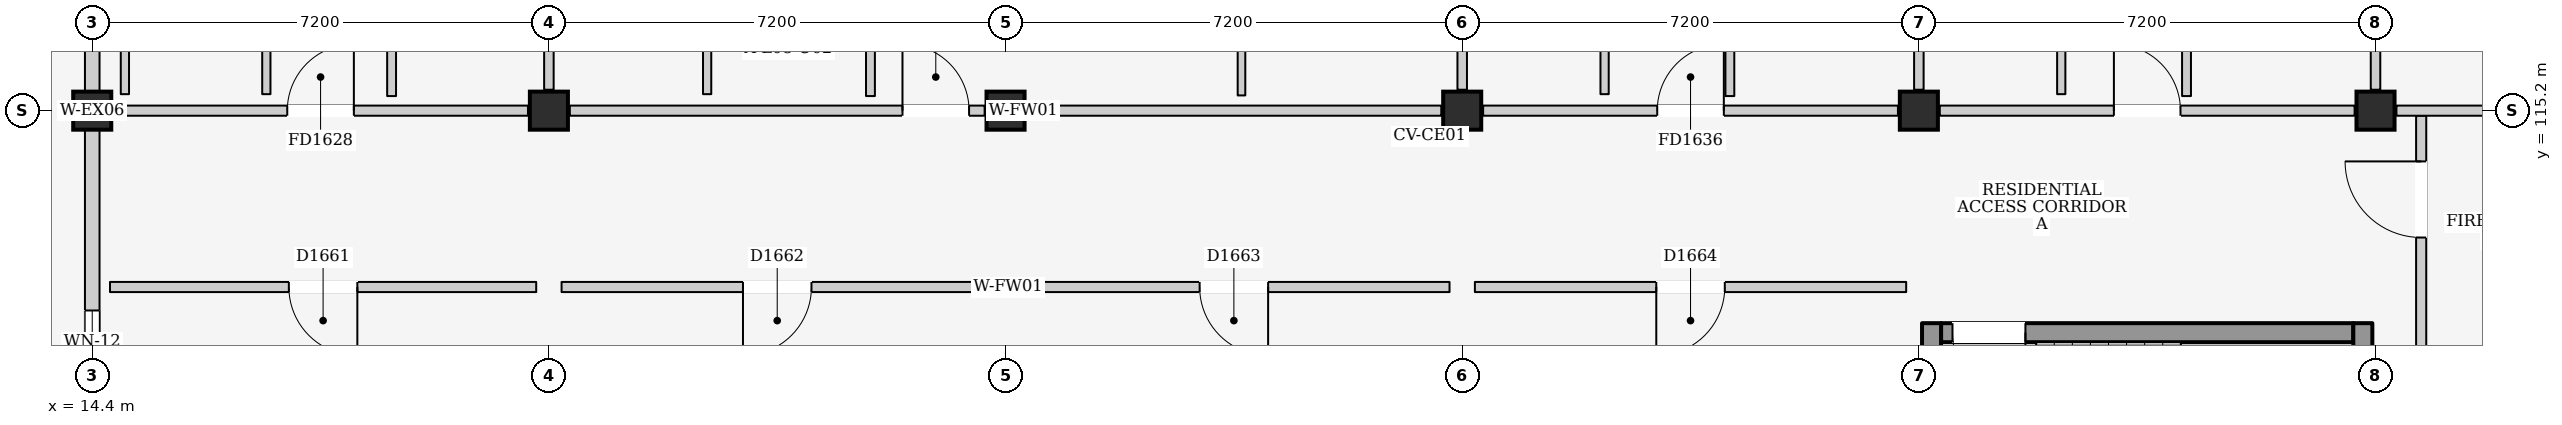
"""IFC4 building model, lengths in metres.
Left out: names, types, materials, properties, quantities, classifications, styles, units other than length and angle.
Written with IfcOpenShell. Run it as: python <this file> out.ifc"""

import sys

from ifc_helpers import new_model, si_unit, direction, frame, frame_2d, origin, origin_2d, place, context, subcontext, project, spatial, rectangle, extrude, element, fill, save


model = new_model("IFC4")
c1 = context("Model", 3, precision=1e-05, world=origin(), true_north=direction((0.0, 1.0)))
c2 = subcontext(c1, "Body", "Model", "MODEL_VIEW")
j1 = project(units=[si_unit("LENGTHUNIT", "METRE"), si_unit("PLANEANGLEUNIT", "RADIAN")], contexts=[c1])
p1 = place(None, origin())
s1 = spatial("IfcSite", under=j1, at=p1, CompositionType="ELEMENT")
p2 = place(p1, origin())
s2 = spatial("IfcBuilding", under=s1, at=p2, CompositionType="ELEMENT")
p3 = place(p2, frame((0.0, 0.0, 28.3)))
s3 = spatial("IfcBuildingStorey", under=s2, at=p3, CompositionType="ELEMENT", Elevation=28.3)
for number, where, z_axis, x_axis in (
    (1, (14.4, 115.2, 0.0), (0.0, 0.0, 1.0), (1.0, 0.0, 0.0)),
    (2, (21.6, 115.2, 0.0), (0.0, 0.0, 1.0), (1.0, 0.0, 0.0)),
    (3, (28.8, 115.2, 0.0), (0.0, 0.0, 1.0), (1.0, 0.0, 0.0)),
    (4, (36.0, 115.2, 0.0), (0.0, 0.0, 1.0), (1.0, 0.0, 0.0)),
    (5, (43.2, 115.2, 0.0), (0.0, 0.0, 1.0), (1.0, 0.0, 0.0)),
    (6, (50.4, 115.2, 0.0), (0.0, 0.0, 1.0), (1.0, 0.0, 0.0)),
):
    element("IfcColumn", number, at=place(p3, frame(where, z_axis=z_axis, x_axis=x_axis)), inside=s3, PredefinedType="COLUMN", context=c2, shape_type="SweptSolid", body=[
        extrude(rectangle(XDim=0.6, YDim=0.6, at=origin_2d()), origin(), (0.0, 0.0, 1.0), 3.2),
    ])
p4 = place(p3, frame((14.4, 108.3, 0.0), z_axis=(0.0, 0.0, 1.0), x_axis=(0.0, 1.0, 0.0)))
e7 = element("IfcWall", 7, at=p4, inside=s3, PredefinedType="ELEMENTEDWALL", context=c2, shape_type="SweptSolid", body=[
    extrude(rectangle(XDim=6.6, YDim=0.23, at=frame_2d((3.3, 0.0))), origin(), (0.0, 0.0, 1.0), 2.435),
])
p5 = place(p4, frame((2.75, 0.0, 1.1)))
e8 = element("IfcOpeningElement", 8, at=p5, cuts=e7, PredefinedType="OPENING", context=c2, shape_type="SweptSolid", body=[
    extrude(rectangle(XDim=1.0, YDim=0.9, at=frame_2d((0.5, 0.45))), frame((0.0, 0.13, 0.0), z_axis=(0.0, -1.0, 0.0), x_axis=(1.0, 0.0, 0.0)), (0.0, 0.0, 1.0), 0.26),
])
p6 = place(p3, frame((14.4, 115.5, 0.0), z_axis=(0.0, 0.0, 1.0), x_axis=(0.0, 1.0, 0.0)))
e9 = element("IfcWall", 9, at=p6, inside=s3, PredefinedType="ELEMENTEDWALL", context=c2, shape_type="SweptSolid", body=[
    extrude(rectangle(XDim=6.6, YDim=0.23, at=frame_2d((3.3, 0.0))), origin(), (0.0, 0.0, 1.0), 2.435),
])
p7 = place(p6, frame((3.6, 0.0, 0.0)))
e10 = element("IfcOpeningElement", 10, at=p7, cuts=e9, PredefinedType="OPENING", context=c2, shape_type="SweptSolid", body=[
    extrude(rectangle(XDim=1.08, YDim=2.12, at=frame_2d((0.54, 1.06))), frame((0.0, 0.13, 0.0), z_axis=(0.0, -1.0, 0.0), x_axis=(1.0, 0.0, 0.0)), (0.0, 0.0, 1.0), 0.26),
])
p8 = place(p3, frame((43.55, 111.7, 0.0), z_axis=(0.0, 0.0, 1.0), x_axis=(1.0, 0.0, 0.0)))
e11 = element("IfcWall", 11, at=p8, inside=s3, PredefinedType="SHEAR", context=c2, shape_type="SweptSolid", body=[
    extrude(rectangle(XDim=6.5, YDim=0.3, at=frame_2d((3.25, 0.0))), origin(), (0.0, 0.0, 1.0), 2.95),
])
p9 = place(p8, frame((0.18, 0.0, 0.0)))
e12 = element("IfcOpeningElement", 12, at=p9, cuts=e11, PredefinedType="OPENING", context=c2, shape_type="SweptSolid", body=[
    extrude(rectangle(XDim=1.15, YDim=2.2, at=frame_2d((0.575, 1.1))), frame((0.0, 0.165, 0.0), z_axis=(0.0, -1.0, 0.0), x_axis=(1.0, 0.0, 0.0)), (0.0, 0.0, 1.0), 0.33),
])
for number, where, z_axis, x_axis in (
    (13, (43.4, 108.15, 0.0), (0.0, 0.0, 1.0), (0.0, 1.0, 0.0)),
    (14, (50.2, 108.15, 0.0), (0.0, 0.0, 1.0), (0.0, 1.0, 0.0)),
):
    element("IfcWall", number, at=place(p3, frame(where, z_axis=z_axis, x_axis=x_axis)), inside=s3, PredefinedType="SHEAR", context=c2, shape_type="SweptSolid", body=[
        extrude(rectangle(XDim=3.7, YDim=0.3, at=frame_2d((1.85, 0.0))), origin(), (0.0, 0.0, 1.0), 2.95),
    ])
p10 = place(p3, frame((51.12, 111.1, 0.0), z_axis=(0.0, 0.0, 1.0), x_axis=(0.0, 1.0, 0.0)))
e15 = element("IfcWall", 15, at=p10, inside=s3, PredefinedType="PARTITIONING", context=c2, shape_type="SweptSolid", body=[
    extrude(rectangle(XDim=4.02, YDim=0.16, at=frame_2d((2.01, 0.0))), origin(), (0.0, 0.0, 1.0), 2.95),
])
p11 = place(p10, frame((2.1, 0.0, 0.0)))
e16 = element("IfcOpeningElement", 16, at=p11, cuts=e15, PredefinedType="OPENING", context=c2, shape_type="SweptSolid", body=[
    extrude(rectangle(XDim=1.2, YDim=2.2, at=frame_2d((0.6, 1.1))), frame((0.0, 0.095, 0.0), z_axis=(0.0, -1.0, 0.0), x_axis=(1.0, 0.0, 0.0)), (0.0, 0.0, 1.0), 0.19),
])
p12 = place(p3, frame((14.73, 115.2, 0.0), z_axis=(0.0, 0.0, 1.0), x_axis=(1.0, 0.0, 0.0)))
e17 = element("IfcWall", 17, at=p12, inside=s3, PredefinedType="PARTITIONING", context=c2, shape_type="SweptSolid", body=[
    extrude(rectangle(XDim=6.54, YDim=0.16, at=frame_2d((3.27, 0.0))), origin(), (0.0, 0.0, 1.0), 2.285),
])
p13 = place(p12, frame((2.745, 0.0, 0.0)))
e18 = element("IfcOpeningElement", 18, at=p13, cuts=e17, PredefinedType="OPENING", context=c2, shape_type="SweptSolid", body=[
    extrude(rectangle(XDim=1.05, YDim=2.15, at=frame_2d((0.525, 1.075))), frame((0.0, 0.095, 0.0), z_axis=(0.0, -1.0, 0.0), x_axis=(1.0, 0.0, 0.0)), (0.0, 0.0, 1.0), 0.19),
])
p14 = place(p3, frame((21.6, 115.53, 0.0), z_axis=(0.0, 0.0, 1.0), x_axis=(0.0, 1.0, 0.0)))
e19 = element("IfcWall", 19, at=p14, inside=s3, PredefinedType="PARTITIONING", context=c2, shape_type="SweptSolid", body=[
    extrude(rectangle(XDim=6.54, YDim=0.15, at=frame_2d((3.27, 0.0))), origin(), (0.0, 0.0, 1.0), 2.435),
])
for number, where, z_axis, x_axis in (
    (20, (17.145, 115.46, 0.0), (0.0, 0.0, 1.0), (0.0, 1.0, 0.0)),
    (21, (14.915, 115.46, 0.0), (0.0, 0.0, 1.0), (0.0, 1.0, 0.0)),
):
    element("IfcWall", number, at=place(p3, frame(where, z_axis=z_axis, x_axis=x_axis)), inside=s3, PredefinedType="PARTITIONING", context=c2, shape_type="SweptSolid", body=[
        extrude(rectangle(XDim=2.13, YDim=0.13, at=frame_2d((1.065, 0.0))), origin(), (0.0, 0.0, 1.0), 2.95),
    ])
p15 = place(p3, frame((19.12, 115.43, 0.0), z_axis=(0.0, 0.0, 1.0), x_axis=(0.0, 1.0, 0.0)))
e22 = element("IfcWall", 22, at=p15, inside=s3, PredefinedType="PARTITIONING", context=c2, shape_type="SweptSolid", body=[
    extrude(rectangle(XDim=2.15, YDim=0.14, at=frame_2d((1.075, 0.0))), origin(), (0.0, 0.0, 1.0), 2.95),
])
p16 = place(p3, frame((21.93, 115.2, 0.0), z_axis=(0.0, 0.0, 1.0), x_axis=(1.0, 0.0, 0.0)))
e23 = element("IfcWall", 23, at=p16, inside=s3, PredefinedType="PARTITIONING", context=c2, shape_type="SweptSolid", body=[
    extrude(rectangle(XDim=6.54, YDim=0.16, at=frame_2d((3.27, 0.0))), origin(), (0.0, 0.0, 1.0), 2.285),
])
p17 = place(p16, frame((5.245, 0.0, 0.0)))
e24 = element("IfcOpeningElement", 24, at=p17, cuts=e23, PredefinedType="OPENING", context=c2, shape_type="SweptSolid", body=[
    extrude(rectangle(XDim=1.05, YDim=2.15, at=frame_2d((0.525, 1.075))), frame((0.0, 0.095, 0.0), z_axis=(0.0, -1.0, 0.0), x_axis=(1.0, 0.0, 0.0)), (0.0, 0.0, 1.0), 0.19),
])
p18 = place(p3, frame((29.13, 115.2, 0.0), z_axis=(0.0, 0.0, 1.0), x_axis=(1.0, 0.0, 0.0)))
e25 = element("IfcWall", 25, at=p18, inside=s3, PredefinedType="PARTITIONING", context=c2, shape_type="SweptSolid", body=[
    extrude(rectangle(XDim=6.54, YDim=0.16, at=frame_2d((3.27, 0.0))), origin(), (0.0, 0.0, 1.0), 2.285),
])
p19 = place(p3, frame((36.0, 115.53, 0.0), z_axis=(0.0, 0.0, 1.0), x_axis=(0.0, 1.0, 0.0)))
e26 = element("IfcWall", 26, at=p19, inside=s3, PredefinedType="PARTITIONING", context=c2, shape_type="SweptSolid", body=[
    extrude(rectangle(XDim=6.54, YDim=0.15, at=frame_2d((3.27, 0.0))), origin(), (0.0, 0.0, 1.0), 2.435),
])
p20 = place(p3, frame((24.095, 115.46, 0.0), z_axis=(0.0, 0.0, 1.0), x_axis=(0.0, 1.0, 0.0)))
e27 = element("IfcWall", 27, at=p20, inside=s3, PredefinedType="PARTITIONING", context=c2, shape_type="SweptSolid", body=[
    extrude(rectangle(XDim=3.04, YDim=0.13, at=frame_2d((1.52, 0.0))), origin(), (0.0, 0.0, 1.0), 2.95),
])
p21 = place(p3, frame((26.67, 115.43, 0.0), z_axis=(0.0, 0.0, 1.0), x_axis=(0.0, 1.0, 0.0)))
e28 = element("IfcWall", 28, at=p21, inside=s3, PredefinedType="PARTITIONING", context=c2, shape_type="SweptSolid", body=[
    extrude(rectangle(XDim=3.06, YDim=0.14, at=frame_2d((1.53, 0.0))), origin(), (0.0, 0.0, 1.0), 2.95),
])
p22 = place(p3, frame((32.52, 115.44, 0.0), z_axis=(0.0, 0.0, 1.0), x_axis=(0.0, 1.0, 0.0)))
e29 = element("IfcWall", 29, at=p22, inside=s3, PredefinedType="PARTITIONING", context=c2, shape_type="SweptSolid", body=[
    extrude(rectangle(XDim=3.04, YDim=0.12, at=frame_2d((1.52, 0.0))), origin(), (0.0, 0.0, 1.0), 2.95),
])
p23 = place(p22, frame((1.04, 0.0, 0.0)))
e30 = element("IfcOpeningElement", 30, at=p23, cuts=e29, PredefinedType="OPENING", context=c2, shape_type="SweptSolid", body=[
    extrude(rectangle(XDim=0.96, YDim=2.15, at=frame_2d((0.48, 1.075))), frame((0.0, 0.075, 0.0), z_axis=(0.0, -1.0, 0.0), x_axis=(1.0, 0.0, 0.0)), (0.0, 0.0, 1.0), 0.15),
])
p24 = place(p3, frame((36.33, 115.2, 0.0), z_axis=(0.0, 0.0, 1.0), x_axis=(1.0, 0.0, 0.0)))
e31 = element("IfcWall", 31, at=p24, inside=s3, PredefinedType="PARTITIONING", context=c2, shape_type="SweptSolid", body=[
    extrude(rectangle(XDim=6.54, YDim=0.16, at=frame_2d((3.27, 0.0))), origin(), (0.0, 0.0, 1.0), 2.285),
])
p25 = place(p24, frame((2.745, 0.0, 0.0)))
e32 = element("IfcOpeningElement", 32, at=p25, cuts=e31, PredefinedType="OPENING", context=c2, shape_type="SweptSolid", body=[
    extrude(rectangle(XDim=1.05, YDim=2.15, at=frame_2d((0.525, 1.075))), frame((0.0, 0.095, 0.0), z_axis=(0.0, -1.0, 0.0), x_axis=(1.0, 0.0, 0.0)), (0.0, 0.0, 1.0), 0.19),
])
p26 = place(p3, frame((43.2, 115.53, 0.0), z_axis=(0.0, 0.0, 1.0), x_axis=(0.0, 1.0, 0.0)))
e33 = element("IfcWall", 33, at=p26, inside=s3, PredefinedType="PARTITIONING", context=c2, shape_type="SweptSolid", body=[
    extrude(rectangle(XDim=6.54, YDim=0.15, at=frame_2d((3.27, 0.0))), origin(), (0.0, 0.0, 1.0), 2.435),
])
p27 = place(p3, frame((38.245, 115.46, 0.0), z_axis=(0.0, 0.0, 1.0), x_axis=(0.0, 1.0, 0.0)))
e34 = element("IfcWall", 34, at=p27, inside=s3, PredefinedType="PARTITIONING", context=c2, shape_type="SweptSolid", body=[
    extrude(rectangle(XDim=2.13, YDim=0.13, at=frame_2d((1.065, 0.0))), origin(), (0.0, 0.0, 1.0), 2.95),
])
p28 = place(p3, frame((40.22, 115.43, 0.0), z_axis=(0.0, 0.0, 1.0), x_axis=(0.0, 1.0, 0.0)))
e35 = element("IfcWall", 35, at=p28, inside=s3, PredefinedType="PARTITIONING", context=c2, shape_type="SweptSolid", body=[
    extrude(rectangle(XDim=2.15, YDim=0.14, at=frame_2d((1.075, 0.0))), origin(), (0.0, 0.0, 1.0), 2.95),
])
p29 = place(p3, frame((43.53, 115.2, 0.0), z_axis=(0.0, 0.0, 1.0), x_axis=(1.0, 0.0, 0.0)))
e36 = element("IfcWall", 36, at=p29, inside=s3, PredefinedType="PARTITIONING", context=c2, shape_type="SweptSolid", body=[
    extrude(rectangle(XDim=6.54, YDim=0.16, at=frame_2d((3.27, 0.0))), origin(), (0.0, 0.0, 1.0), 2.285),
])
p30 = place(p29, frame((2.745, 0.0, 0.0)))
e37 = element("IfcOpeningElement", 37, at=p30, cuts=e36, PredefinedType="OPENING", context=c2, shape_type="SweptSolid", body=[
    extrude(rectangle(XDim=1.05, YDim=2.15, at=frame_2d((0.525, 1.075))), frame((0.0, 0.095, 0.0), z_axis=(0.0, -1.0, 0.0), x_axis=(1.0, 0.0, 0.0)), (0.0, 0.0, 1.0), 0.19),
])
p31 = place(p3, frame((50.4, 115.53, 0.0), z_axis=(0.0, 0.0, 1.0), x_axis=(0.0, 1.0, 0.0)))
e38 = element("IfcWall", 38, at=p31, inside=s3, PredefinedType="PARTITIONING", context=c2, shape_type="SweptSolid", body=[
    extrude(rectangle(XDim=6.54, YDim=0.15, at=frame_2d((3.27, 0.0))), origin(), (0.0, 0.0, 1.0), 2.435),
])
p32 = place(p3, frame((45.445, 115.46, 0.0), z_axis=(0.0, 0.0, 1.0), x_axis=(0.0, 1.0, 0.0)))
e39 = element("IfcWall", 39, at=p32, inside=s3, PredefinedType="PARTITIONING", context=c2, shape_type="SweptSolid", body=[
    extrude(rectangle(XDim=2.13, YDim=0.13, at=frame_2d((1.065, 0.0))), origin(), (0.0, 0.0, 1.0), 2.95),
])
p33 = place(p3, frame((47.42, 115.43, 0.0), z_axis=(0.0, 0.0, 1.0), x_axis=(0.0, 1.0, 0.0)))
e40 = element("IfcWall", 40, at=p33, inside=s3, PredefinedType="PARTITIONING", context=c2, shape_type="SweptSolid", body=[
    extrude(rectangle(XDim=2.15, YDim=0.14, at=frame_2d((1.075, 0.0))), origin(), (0.0, 0.0, 1.0), 2.95),
])
p34 = place(p3, frame((50.73, 115.2, 0.0), z_axis=(0.0, 0.0, 1.0), x_axis=(1.0, 0.0, 0.0)))
e41 = element("IfcWall", 41, at=p34, inside=s3, PredefinedType="PARTITIONING", context=c2, shape_type="SweptSolid", body=[
    extrude(rectangle(XDim=6.54, YDim=0.16, at=frame_2d((3.27, 0.0))), origin(), (0.0, 0.0, 1.0), 2.285),
])
p35 = place(p3, frame((14.68, 112.42, 0.0), z_axis=(0.0, 0.0, 1.0), x_axis=(1.0, 0.0, 0.0)))
e42 = element("IfcWall", 42, at=p35, inside=s3, PredefinedType="PARTITIONING", context=c2, shape_type="SweptSolid", body=[
    extrude(rectangle(XDim=6.72, YDim=0.16, at=frame_2d((3.36, 0.0))), origin(), (0.0, 0.0, 1.0), 2.95),
])
p36 = place(p35, frame((2.82, 0.0, 0.0)))
e43 = element("IfcOpeningElement", 43, at=p36, cuts=e42, PredefinedType="OPENING", context=c2, shape_type="SweptSolid", body=[
    extrude(rectangle(XDim=1.08, YDim=2.22, at=frame_2d((0.54, 1.11))), frame((0.0, 0.095, 0.0), z_axis=(0.0, -1.0, 0.0), x_axis=(1.0, 0.0, 0.0)), (0.0, 0.0, 1.0), 0.19),
])
p37 = place(p3, frame((21.8, 112.42, 0.0), z_axis=(0.0, 0.0, 1.0), x_axis=(1.0, 0.0, 0.0)))
e44 = element("IfcWall", 44, at=p37, inside=s3, PredefinedType="PARTITIONING", context=c2, shape_type="SweptSolid", body=[
    extrude(rectangle(XDim=6.8, YDim=0.16, at=frame_2d((3.4, 0.0))), origin(), (0.0, 0.0, 1.0), 2.95),
])
p38 = place(p37, frame((2.86, 0.0, 0.0)))
e45 = element("IfcOpeningElement", 45, at=p38, cuts=e44, PredefinedType="OPENING", context=c2, shape_type="SweptSolid", body=[
    extrude(rectangle(XDim=1.08, YDim=2.22, at=frame_2d((0.54, 1.11))), frame((0.0, 0.095, 0.0), z_axis=(0.0, -1.0, 0.0), x_axis=(1.0, 0.0, 0.0)), (0.0, 0.0, 1.0), 0.19),
])
p39 = place(p3, frame((29.0, 112.42, 0.0), z_axis=(0.0, 0.0, 1.0), x_axis=(1.0, 0.0, 0.0)))
e46 = element("IfcWall", 46, at=p39, inside=s3, PredefinedType="PARTITIONING", context=c2, shape_type="SweptSolid", body=[
    extrude(rectangle(XDim=6.8, YDim=0.16, at=frame_2d((3.4, 0.0))), origin(), (0.0, 0.0, 1.0), 2.95),
])
p40 = place(p39, frame((2.86, 0.0, 0.0)))
e47 = element("IfcOpeningElement", 47, at=p40, cuts=e46, PredefinedType="OPENING", context=c2, shape_type="SweptSolid", body=[
    extrude(rectangle(XDim=1.08, YDim=2.22, at=frame_2d((0.54, 1.11))), frame((0.0, 0.095, 0.0), z_axis=(0.0, -1.0, 0.0), x_axis=(1.0, 0.0, 0.0)), (0.0, 0.0, 1.0), 0.19),
])
p41 = place(p3, frame((36.2, 112.42, 0.0), z_axis=(0.0, 0.0, 1.0), x_axis=(1.0, 0.0, 0.0)))
e48 = element("IfcWall", 48, at=p41, inside=s3, PredefinedType="PARTITIONING", context=c2, shape_type="SweptSolid", body=[
    extrude(rectangle(XDim=6.8, YDim=0.16, at=frame_2d((3.4, 0.0))), origin(), (0.0, 0.0, 1.0), 2.95),
])
p42 = place(p41, frame((2.86, 0.0, 0.0)))
e49 = element("IfcOpeningElement", 49, at=p42, cuts=e48, PredefinedType="OPENING", context=c2, shape_type="SweptSolid", body=[
    extrude(rectangle(XDim=1.08, YDim=2.22, at=frame_2d((0.54, 1.11))), frame((0.0, 0.095, 0.0), z_axis=(0.0, -1.0, 0.0), x_axis=(1.0, 0.0, 0.0)), (0.0, 0.0, 1.0), 0.19),
])
p43 = place(p5, origin())
e50 = element("IfcWindow", 50, at=p43, inside=s3, PartitioningType="SINGLE_PANEL", PredefinedType="WINDOW", context=c2, shape_type="SweptSolid", body=[
    extrude(rectangle(XDim=1.0, YDim=0.9, at=frame_2d((0.5, 0.45))), frame((0.0, 0.03, 0.0), z_axis=(0.0, -1.0, 0.0), x_axis=(1.0, 0.0, 0.0)), (0.0, 0.0, 1.0), 0.06),
])
fill(e8, e50)
p44 = place(p9, frame((1.15, 0.0, 0.0), z_axis=(0.0, 0.0, 1.0), x_axis=(-1.0, 0.0, 0.0)))
e51 = element("IfcDoor", 51, at=p44, inside=s3, OperationType="SINGLE_SWING_LEFT", PredefinedType="DOOR", context=c2, shape_type="SweptSolid", body=[
    extrude(rectangle(XDim=1.15, YDim=2.2, at=frame_2d((0.575, 1.1))), frame((0.0, 0.025, 0.0), z_axis=(0.0, -1.0, 0.0), x_axis=(1.0, 0.0, 0.0)), (0.0, 0.0, 1.0), 0.05),
])
fill(e12, e51)
p45 = place(p11, origin())
e52 = element("IfcDoor", 52, at=p45, inside=s3, OperationType="SINGLE_SWING_RIGHT", PredefinedType="DOOR", context=c2, shape_type="SweptSolid", body=[
    extrude(rectangle(XDim=1.2, YDim=2.2, at=frame_2d((0.6, 1.1))), frame((0.0, 0.025, 0.0), z_axis=(0.0, -1.0, 0.0), x_axis=(1.0, 0.0, 0.0)), (0.0, 0.0, 1.0), 0.05),
])
fill(e16, e52)
p46 = place(p13, origin())
e53 = element("IfcDoor", 53, at=p46, inside=s3, OperationType="SINGLE_SWING_RIGHT", PredefinedType="DOOR", context=c2, shape_type="SweptSolid", body=[
    extrude(rectangle(XDim=1.05, YDim=2.15, at=frame_2d((0.525, 1.075))), frame((0.0, 0.025, 0.0), z_axis=(0.0, -1.0, 0.0), x_axis=(1.0, 0.0, 0.0)), (0.0, 0.0, 1.0), 0.05),
])
fill(e18, e53)
p47 = place(p17, origin())
e54 = element("IfcDoor", 54, at=p47, inside=s3, OperationType="SINGLE_SWING_LEFT", PredefinedType="DOOR", context=c2, shape_type="SweptSolid", body=[
    extrude(rectangle(XDim=1.05, YDim=2.15, at=frame_2d((0.525, 1.075))), frame((0.0, 0.025, 0.0), z_axis=(0.0, -1.0, 0.0), x_axis=(1.0, 0.0, 0.0)), (0.0, 0.0, 1.0), 0.05),
])
fill(e24, e54)
p48 = place(p25, origin())
e55 = element("IfcDoor", 55, at=p48, inside=s3, OperationType="SINGLE_SWING_RIGHT", PredefinedType="DOOR", context=c2, shape_type="SweptSolid", body=[
    extrude(rectangle(XDim=1.05, YDim=2.15, at=frame_2d((0.525, 1.075))), frame((0.0, 0.025, 0.0), z_axis=(0.0, -1.0, 0.0), x_axis=(1.0, 0.0, 0.0)), (0.0, 0.0, 1.0), 0.05),
])
fill(e32, e55)
p49 = place(p30, origin())
e56 = element("IfcDoor", 56, at=p49, inside=s3, OperationType="SINGLE_SWING_LEFT", PredefinedType="DOOR", context=c2, shape_type="SweptSolid", body=[
    extrude(rectangle(XDim=1.05, YDim=2.15, at=frame_2d((0.525, 1.075))), frame((0.0, 0.025, 0.0), z_axis=(0.0, -1.0, 0.0), x_axis=(1.0, 0.0, 0.0)), (0.0, 0.0, 1.0), 0.05),
])
fill(e37, e56)
p50 = place(p36, frame((1.08, 0.0, 0.0), z_axis=(0.0, 0.0, 1.0), x_axis=(-1.0, 0.0, 0.0)))
e57 = element("IfcDoor", 57, at=p50, inside=s3, OperationType="SINGLE_SWING_LEFT", PredefinedType="DOOR", context=c2, shape_type="SweptSolid", body=[
    extrude(rectangle(XDim=1.08, YDim=2.22, at=frame_2d((0.54, 1.11))), frame((0.0, 0.025, 0.0), z_axis=(0.0, -1.0, 0.0), x_axis=(1.0, 0.0, 0.0)), (0.0, 0.0, 1.0), 0.05),
])
fill(e43, e57)
p51 = place(p38, frame((1.08, 0.0, 0.0), z_axis=(0.0, 0.0, 1.0), x_axis=(-1.0, 0.0, 0.0)))
e58 = element("IfcDoor", 58, at=p51, inside=s3, OperationType="SINGLE_SWING_RIGHT", PredefinedType="DOOR", context=c2, shape_type="SweptSolid", body=[
    extrude(rectangle(XDim=1.08, YDim=2.22, at=frame_2d((0.54, 1.11))), frame((0.0, 0.025, 0.0), z_axis=(0.0, -1.0, 0.0), x_axis=(1.0, 0.0, 0.0)), (0.0, 0.0, 1.0), 0.05),
])
fill(e45, e58)
p52 = place(p40, frame((1.08, 0.0, 0.0), z_axis=(0.0, 0.0, 1.0), x_axis=(-1.0, 0.0, 0.0)))
e59 = element("IfcDoor", 59, at=p52, inside=s3, OperationType="SINGLE_SWING_LEFT", PredefinedType="DOOR", context=c2, shape_type="SweptSolid", body=[
    extrude(rectangle(XDim=1.08, YDim=2.22, at=frame_2d((0.54, 1.11))), frame((0.0, 0.025, 0.0), z_axis=(0.0, -1.0, 0.0), x_axis=(1.0, 0.0, 0.0)), (0.0, 0.0, 1.0), 0.05),
])
fill(e47, e59)
p53 = place(p42, frame((1.08, 0.0, 0.0), z_axis=(0.0, 0.0, 1.0), x_axis=(-1.0, 0.0, 0.0)))
e60 = element("IfcDoor", 60, at=p53, inside=s3, OperationType="SINGLE_SWING_RIGHT", PredefinedType="DOOR", context=c2, shape_type="SweptSolid", body=[
    extrude(rectangle(XDim=1.08, YDim=2.22, at=frame_2d((0.54, 1.11))), frame((0.0, 0.025, 0.0), z_axis=(0.0, -1.0, 0.0), x_axis=(1.0, 0.0, 0.0)), (0.0, 0.0, 1.0), 0.05),
])
fill(e49, e60)
save(model, sys.argv[1])
